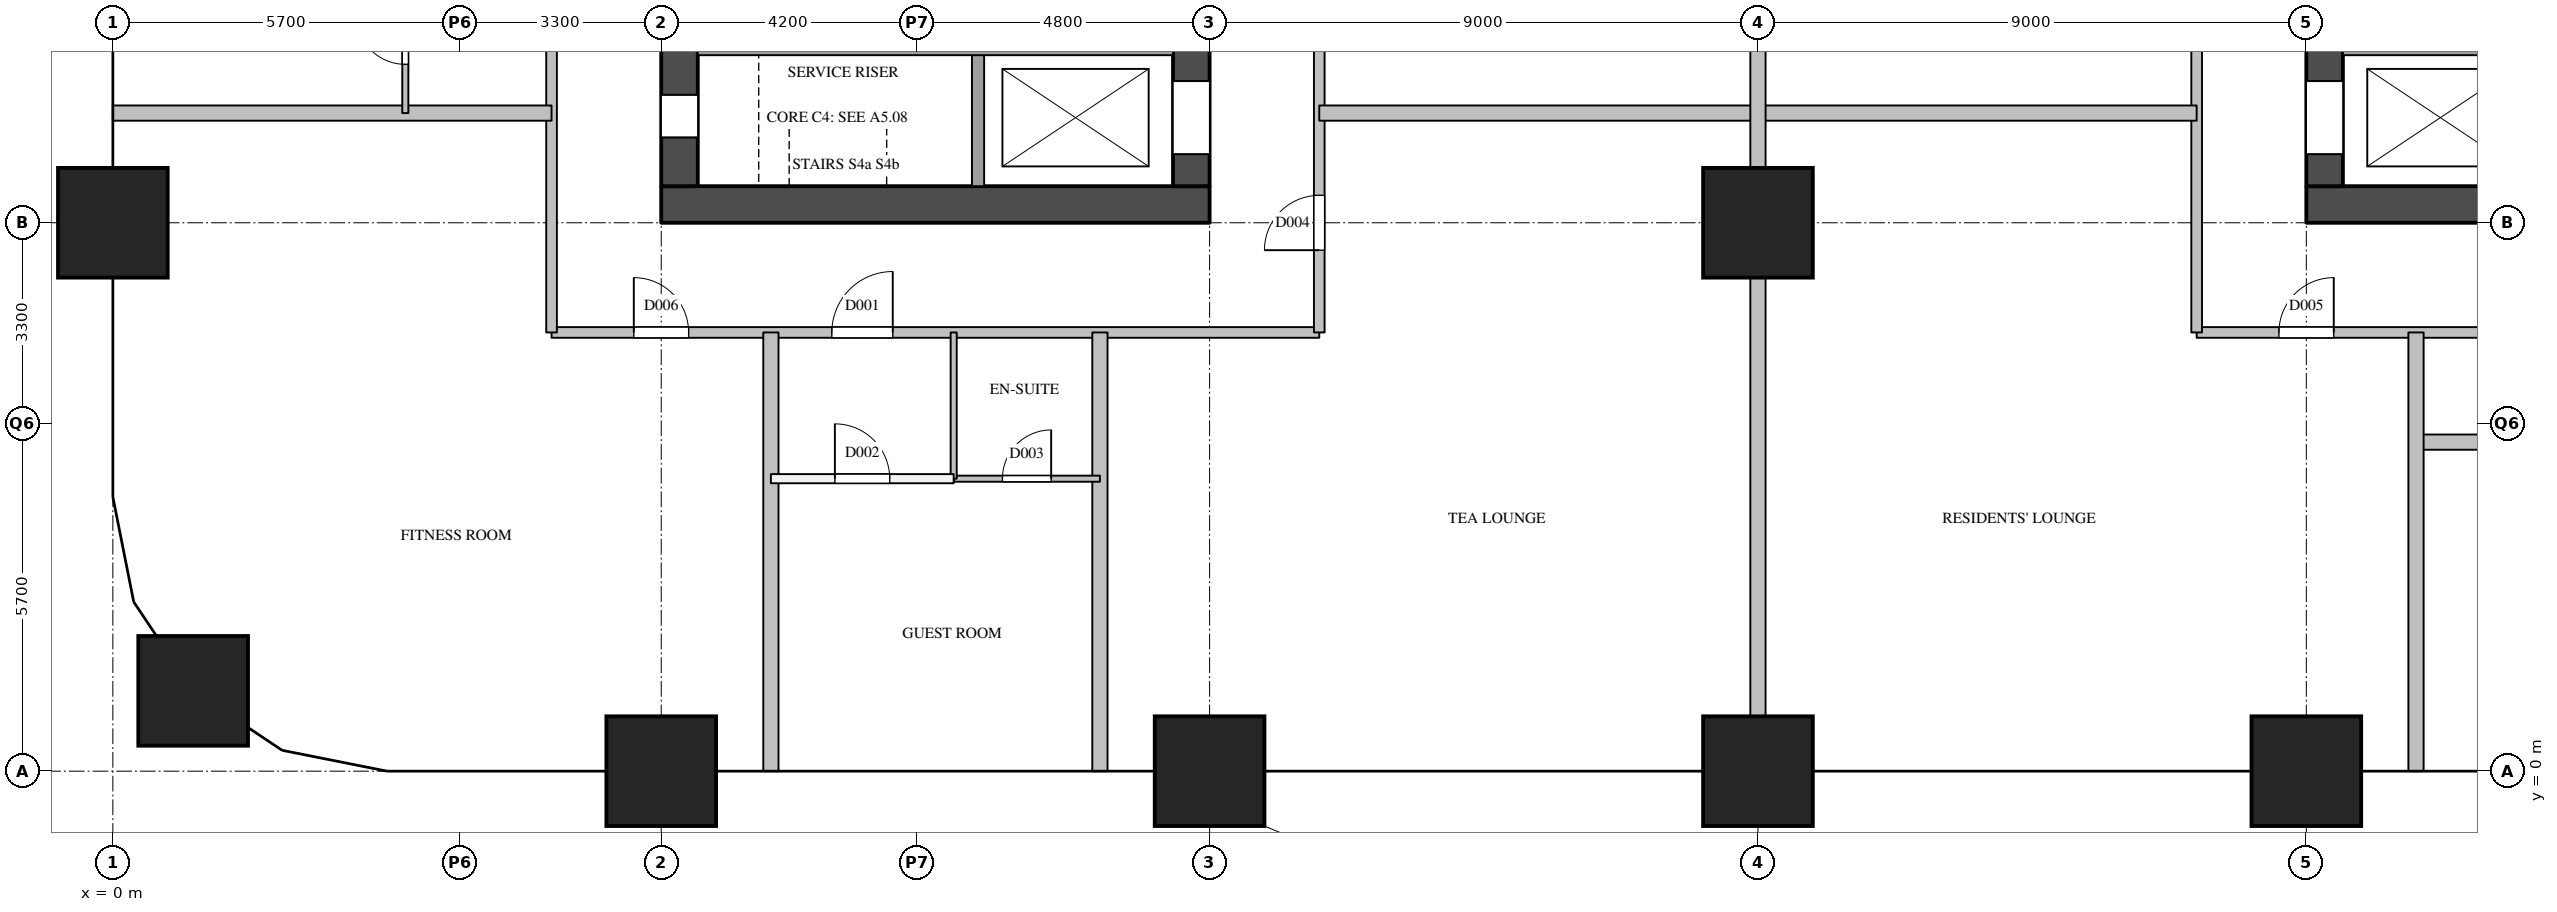
"""IFC4 building model, lengths in metres.
Left out: names, types, materials, properties, quantities, classifications, styles, units other than length and angle.
Written with IfcOpenShell. Run it as: python <this file> out.ifc"""

import sys

from ifc_helpers import new_model, si_unit, direction, frame, frame_2d, origin, origin_2d, place, context, subcontext, project, spatial, rectangle, extrude, element, fill, save


model = new_model("IFC4")
c1 = context("Model", 3, precision=1e-05, world=origin(), true_north=direction((0.0, 1.0)))
c2 = subcontext(c1, "Body", "Model", "MODEL_VIEW")
j1 = project(units=[si_unit("LENGTHUNIT", "METRE"), si_unit("PLANEANGLEUNIT", "RADIAN")], contexts=[c1])
p1 = place(None, origin())
s1 = spatial("IfcSite", under=j1, at=p1, CompositionType="ELEMENT")
p2 = place(p1, origin())
s2 = spatial("IfcBuilding", under=s1, at=p2, CompositionType="ELEMENT")
p3 = place(p2, frame((0.0, 0.0, 31.0)))
s3 = spatial("IfcBuildingStorey", under=s2, at=p3, CompositionType="ELEMENT", Elevation=31.0)
for number, where, z_axis, x_axis in (
    (1, (1.318, 1.318, 0.0), (0.0, 0.0, 1.0), (1.0, 0.0, 0.0)),
    (2, (0.0, 9.0, 0.0), (0.0, 0.0, 1.0), (1.0, 0.0, 0.0)),
    (3, (9.0, 0.0, 0.0), (0.0, 0.0, 1.0), (1.0, 0.0, 0.0)),
    (4, (18.0, 0.0, 0.0), (0.0, 0.0, 1.0), (1.0, 0.0, 0.0)),
    (5, (27.0, 0.0, 0.0), (0.0, 0.0, 1.0), (1.0, 0.0, 0.0)),
    (6, (27.0, 9.0, 0.0), (0.0, 0.0, 1.0), (1.0, 0.0, 0.0)),
    (7, (36.0, 0.0, 0.0), (0.0, 0.0, 1.0), (1.0, 0.0, 0.0)),
):
    element("IfcColumn", number, at=place(p3, frame(where, z_axis=z_axis, x_axis=x_axis)), inside=s3, PredefinedType="COLUMN", context=c2, shape_type="SweptSolid", body=[
        extrude(rectangle(XDim=1.8, YDim=1.8, at=origin_2d()), origin(), (0.0, 0.0, 1.0), 3.8),
    ])
p4 = place(p3, frame((36.0, 9.3, 0.0), z_axis=(0.0, 0.0, 1.0), x_axis=(1.0, 0.0, 0.0)))
e8 = element("IfcWall", 8, at=p4, inside=s3, PredefinedType="SHEAR", context=c2, shape_type="SweptSolid", body=[
    extrude(rectangle(XDim=9.0, YDim=0.6, at=frame_2d((4.5, 0.0))), origin(), (0.0, 0.0, 1.0), 3.5),
])
p5 = place(p3, frame((36.3, 9.6, 0.0), z_axis=(0.0, 0.0, 1.0), x_axis=(0.0, 1.0, 0.0)))
e9 = element("IfcWall", 9, at=p5, inside=s3, PredefinedType="SHEAR", context=c2, shape_type="SweptSolid", body=[
    extrude(rectangle(XDim=12.3, YDim=0.6, at=frame_2d((6.15, 0.0))), origin(), (0.0, 0.0, 1.0), 3.5),
])
p6 = place(p5, frame((0.525, 0.0, 0.0)))
e10 = element("IfcOpeningElement", 10, at=p6, cuts=e9, PredefinedType="OPENING", context=c2, shape_type="SweptSolid", body=[
    extrude(rectangle(XDim=1.2, YDim=2.1, at=frame_2d((0.6, 1.05))), frame((0.0, 0.31, 0.0), z_axis=(0.0, -1.0, 0.0), x_axis=(1.0, 0.0, 0.0)), (0.0, 0.0, 1.0), 0.62),
])
p7 = place(p5, frame((4.8, 0.0, 0.0)))
e11 = element("IfcOpeningElement", 11, at=p7, cuts=e9, PredefinedType="OPENING", context=c2, shape_type="SweptSolid", body=[
    extrude(rectangle(XDim=1.0, YDim=2.1, at=frame_2d((0.5, 1.05))), frame((0.0, 0.31, 0.0), z_axis=(0.0, -1.0, 0.0), x_axis=(1.0, 0.0, 0.0)), (0.0, 0.0, 1.0), 0.62),
])
p8 = place(p3, frame((36.6, 11.85, 0.0), z_axis=(0.0, 0.0, 1.0), x_axis=(1.0, 0.0, 0.0)))
e12 = element("IfcWall", 12, at=p8, inside=s3, PredefinedType="SOLIDWALL", context=c2, shape_type="SweptSolid", body=[
    extrude(rectangle(XDim=7.8, YDim=0.2, at=frame_2d((3.9, 0.0))), origin(), (0.0, 0.0, 1.0), 3.5),
])
p9 = place(p3, frame((9.0, 9.3, 0.0), z_axis=(0.0, 0.0, 1.0), x_axis=(1.0, 0.0, 0.0)))
e13 = element("IfcWall", 13, at=p9, inside=s3, PredefinedType="SHEAR", context=c2, shape_type="SweptSolid", body=[
    extrude(rectangle(XDim=9.0, YDim=0.6, at=frame_2d((4.5, 0.0))), origin(), (0.0, 0.0, 1.0), 3.5),
])
p10 = place(p3, frame((9.3, 9.6, 0.0), z_axis=(0.0, 0.0, 1.0), x_axis=(0.0, 1.0, 0.0)))
e14 = element("IfcWall", 14, at=p10, inside=s3, PredefinedType="SHEAR", context=c2, shape_type="SweptSolid", body=[
    extrude(rectangle(XDim=12.3, YDim=0.6, at=frame_2d((6.15, 0.0))), origin(), (0.0, 0.0, 1.0), 3.5),
])
p11 = place(p10, frame((0.8, 0.0, 0.0)))
e15 = element("IfcOpeningElement", 15, at=p11, cuts=e14, PredefinedType="OPENING", context=c2, shape_type="SweptSolid", body=[
    extrude(rectangle(XDim=0.7, YDim=2.1, at=frame_2d((0.35, 1.05))), frame((0.0, 0.31, 0.0), z_axis=(0.0, -1.0, 0.0), x_axis=(1.0, 0.0, 0.0)), (0.0, 0.0, 1.0), 0.62),
])
p12 = place(p10, frame((4.8, 0.0, 0.0)))
e16 = element("IfcOpeningElement", 16, at=p12, cuts=e14, PredefinedType="OPENING", context=c2, shape_type="SweptSolid", body=[
    extrude(rectangle(XDim=1.0, YDim=2.1, at=frame_2d((0.5, 1.05))), frame((0.0, 0.31, 0.0), z_axis=(0.0, -1.0, 0.0), x_axis=(1.0, 0.0, 0.0)), (0.0, 0.0, 1.0), 0.62),
])
p13 = place(p3, frame((17.7, 9.6, 0.0), z_axis=(0.0, 0.0, 1.0), x_axis=(0.0, 1.0, 0.0)))
e17 = element("IfcWall", 17, at=p13, inside=s3, PredefinedType="SHEAR", context=c2, shape_type="SweptSolid", body=[
    extrude(rectangle(XDim=12.3, YDim=0.6, at=frame_2d((6.15, 0.0))), origin(), (0.0, 0.0, 1.0), 3.5),
])
p14 = place(p13, frame((0.525, 0.0, 0.0)))
e18 = element("IfcOpeningElement", 18, at=p14, cuts=e17, PredefinedType="OPENING", context=c2, shape_type="SweptSolid", body=[
    extrude(rectangle(XDim=1.2, YDim=2.1, at=frame_2d((0.6, 1.05))), frame((0.0, 0.31, 0.0), z_axis=(0.0, -1.0, 0.0), x_axis=(1.0, 0.0, 0.0)), (0.0, 0.0, 1.0), 0.62),
])
p15 = place(p3, frame((14.2, 9.6, 0.0), z_axis=(0.0, 0.0, 1.0), x_axis=(0.0, 1.0, 0.0)))
e19 = element("IfcWall", 19, at=p15, inside=s3, PredefinedType="SOLIDWALL", context=c2, shape_type="SweptSolid", body=[
    extrude(rectangle(XDim=2.3, YDim=0.2, at=frame_2d((1.15, 0.0))), origin(), (0.0, 0.0, 1.0), 3.5),
])
p16 = place(p3, frame((9.6, 11.85, 0.0), z_axis=(0.0, 0.0, 1.0), x_axis=(1.0, 0.0, 0.0)))
e20 = element("IfcWall", 20, at=p16, inside=s3, PredefinedType="SOLIDWALL", context=c2, shape_type="SweptSolid", body=[
    extrude(rectangle(XDim=7.8, YDim=0.2, at=frame_2d((3.9, 0.0))), origin(), (0.0, 0.0, 1.0), 3.5),
])
p17 = place(p3, frame((7.2, 7.2, 0.0), z_axis=(0.0, 0.0, 1.0), x_axis=(1.0, 0.0, 0.0)))
e21 = element("IfcWall", 21, at=p17, inside=s3, PredefinedType="PARTITIONING", context=c2, shape_type="SweptSolid", body=[
    extrude(rectangle(XDim=12.6, YDim=0.175, at=frame_2d((6.3, 0.0))), origin(), (0.0, 0.0, 1.0), 3.5),
])
p18 = place(p17, frame((4.6, 0.0, 0.0)))
e22 = element("IfcOpeningElement", 22, at=p18, cuts=e21, PredefinedType="OPENING", context=c2, shape_type="SweptSolid", body=[
    extrude(rectangle(XDim=1.0, YDim=2.1, at=frame_2d((0.5, 1.05))), frame((0.0, 0.097, 0.0), z_axis=(0.0, -1.0, 0.0), x_axis=(1.0, 0.0, 0.0)), (0.0, 0.0, 1.0), 0.195),
])
p19 = place(p17, frame((1.35, 0.0, 0.0)))
e23 = element("IfcOpeningElement", 23, at=p19, cuts=e21, PredefinedType="OPENING", context=c2, shape_type="SweptSolid", body=[
    extrude(rectangle(XDim=0.9, YDim=2.1, at=frame_2d((0.45, 1.05))), frame((0.0, 0.097, 0.0), z_axis=(0.0, -1.0, 0.0), x_axis=(1.0, 0.0, 0.0)), (0.0, 0.0, 1.0), 0.195),
])
p20 = place(p3, frame((34.2, 7.2, 0.0), z_axis=(0.0, 0.0, 1.0), x_axis=(1.0, 0.0, 0.0)))
e24 = element("IfcWall", 24, at=p20, inside=s3, PredefinedType="PARTITIONING", context=c2, shape_type="SweptSolid", body=[
    extrude(rectangle(XDim=12.6, YDim=0.175, at=frame_2d((6.3, 0.0))), origin(), (0.0, 0.0, 1.0), 3.5),
])
p21 = place(p20, frame((1.35, 0.0, 0.0)))
e25 = element("IfcOpeningElement", 25, at=p21, cuts=e24, PredefinedType="OPENING", context=c2, shape_type="SweptSolid", body=[
    extrude(rectangle(XDim=0.9, YDim=2.1, at=frame_2d((0.45, 1.05))), frame((0.0, 0.097, 0.0), z_axis=(0.0, -1.0, 0.0), x_axis=(1.0, 0.0, 0.0)), (0.0, 0.0, 1.0), 0.195),
])
p22 = place(p20, frame((5.85, 0.0, 0.0)))
e26 = element("IfcOpeningElement", 26, at=p22, cuts=e24, PredefinedType="OPENING", context=c2, shape_type="SweptSolid", body=[
    extrude(rectangle(XDim=0.9, YDim=2.1, at=frame_2d((0.45, 1.05))), frame((0.0, 0.097, 0.0), z_axis=(0.0, -1.0, 0.0), x_axis=(1.0, 0.0, 0.0)), (0.0, 0.0, 1.0), 0.195),
])
p23 = place(p3, frame((7.2, 7.2, 0.0), z_axis=(0.0, 0.0, 1.0), x_axis=(0.0, 1.0, 0.0)))
e27 = element("IfcWall", 27, at=p23, inside=s3, PredefinedType="PARTITIONING", context=c2, shape_type="SweptSolid", body=[
    extrude(rectangle(XDim=16.49, YDim=0.175, at=frame_2d((8.245, 0.0))), origin(), (0.0, 0.0, 1.0), 3.5),
])
p24 = place(p23, frame((9.7, 0.0, 0.0)))
e28 = element("IfcOpeningElement", 28, at=p24, cuts=e27, PredefinedType="OPENING", context=c2, shape_type="SweptSolid", body=[
    extrude(rectangle(XDim=1.0, YDim=2.1, at=frame_2d((0.5, 1.05))), frame((0.0, 0.097, 0.0), z_axis=(0.0, -1.0, 0.0), x_axis=(1.0, 0.0, 0.0)), (0.0, 0.0, 1.0), 0.195),
])
p25 = place(p3, frame((19.8, 7.2, 0.0), z_axis=(0.0, 0.0, 1.0), x_axis=(0.0, 1.0, 0.0)))
e29 = element("IfcWall", 29, at=p25, inside=s3, PredefinedType="PARTITIONING", context=c2, shape_type="SweptSolid", body=[
    extrude(rectangle(XDim=16.49, YDim=0.175, at=frame_2d((8.245, 0.0))), origin(), (0.0, 0.0, 1.0), 3.5),
])
p26 = place(p25, frame((1.35, 0.0, 0.0)))
e30 = element("IfcOpeningElement", 30, at=p26, cuts=e29, PredefinedType="OPENING", context=c2, shape_type="SweptSolid", body=[
    extrude(rectangle(XDim=0.9, YDim=2.1, at=frame_2d((0.45, 1.05))), frame((0.0, 0.097, 0.0), z_axis=(0.0, -1.0, 0.0), x_axis=(1.0, 0.0, 0.0)), (0.0, 0.0, 1.0), 0.195),
])
p27 = place(p25, frame((8.5, 0.0, 0.0)))
e31 = element("IfcOpeningElement", 31, at=p27, cuts=e29, PredefinedType="OPENING", context=c2, shape_type="SweptSolid", body=[
    extrude(rectangle(XDim=1.0, YDim=2.1, at=frame_2d((0.5, 1.05))), frame((0.0, 0.097, 0.0), z_axis=(0.0, -1.0, 0.0), x_axis=(1.0, 0.0, 0.0)), (0.0, 0.0, 1.0), 0.195),
])
p28 = place(p3, frame((34.2, 7.2, 0.0), z_axis=(0.0, 0.0, 1.0), x_axis=(0.0, 1.0, 0.0)))
e32 = element("IfcWall", 32, at=p28, inside=s3, PredefinedType="PARTITIONING", context=c2, shape_type="SweptSolid", body=[
    extrude(rectangle(XDim=16.49, YDim=0.175, at=frame_2d((8.245, 0.0))), origin(), (0.0, 0.0, 1.0), 3.5),
])
p29 = place(p28, frame((5.8, 0.0, 0.0)))
e33 = element("IfcOpeningElement", 33, at=p29, cuts=e32, PredefinedType="OPENING", context=c2, shape_type="SweptSolid", body=[
    extrude(rectangle(XDim=1.0, YDim=2.1, at=frame_2d((0.5, 1.05))), frame((0.0, 0.097, 0.0), z_axis=(0.0, -1.0, 0.0), x_axis=(1.0, 0.0, 0.0)), (0.0, 0.0, 1.0), 0.195),
])
p30 = place(p28, frame((12.245, 0.0, 0.0)))
e34 = element("IfcOpeningElement", 34, at=p30, cuts=e32, PredefinedType="OPENING", context=c2, shape_type="SweptSolid", body=[
    extrude(rectangle(XDim=1.0, YDim=2.1, at=frame_2d((0.5, 1.05))), frame((0.0, 0.097, 0.0), z_axis=(0.0, -1.0, 0.0), x_axis=(1.0, 0.0, 0.0)), (0.0, 0.0, 1.0), 0.195),
])
p31 = place(p3, frame((10.8, 4.8, 0.0), z_axis=(0.0, 0.0, 1.0), x_axis=(1.0, 0.0, 0.0)))
e35 = element("IfcWall", 35, at=p31, inside=s3, PredefinedType="PARTITIONING", context=c2, shape_type="SweptSolid", body=[
    extrude(rectangle(XDim=3.0, YDim=0.15, at=frame_2d((1.5, 0.0))), origin(), (0.0, 0.0, 1.0), 3.5),
])
p32 = place(p31, frame((1.05, 0.0, 0.0)))
e36 = element("IfcOpeningElement", 36, at=p32, cuts=e35, PredefinedType="OPENING", context=c2, shape_type="SweptSolid", body=[
    extrude(rectangle(XDim=0.9, YDim=2.1, at=frame_2d((0.45, 1.05))), frame((0.0, 0.085, 0.0), z_axis=(0.0, -1.0, 0.0), x_axis=(1.0, 0.0, 0.0)), (0.0, 0.0, 1.0), 0.17),
])
p33 = place(p3, frame((37.8, 5.4, 0.0), z_axis=(0.0, 0.0, 1.0), x_axis=(1.0, 0.0, 0.0)))
e37 = element("IfcWall", 37, at=p33, inside=s3, PredefinedType="PARTITIONING", context=c2, shape_type="SweptSolid", body=[
    extrude(rectangle(XDim=5.525, YDim=0.25, at=frame_2d((2.762, 0.0))), origin(), (0.0, 0.0, 1.0), 3.5),
])
p34 = place(p3, frame((0.0, 10.8, 0.0), z_axis=(0.0, 0.0, 1.0), x_axis=(1.0, 0.0, 0.0)))
e38 = element("IfcWall", 38, at=p34, inside=s3, PredefinedType="PARTITIONING", context=c2, shape_type="SweptSolid", body=[
    extrude(rectangle(XDim=7.2, YDim=0.25, at=frame_2d((3.6, 0.0))), origin(), (0.0, 0.0, 1.0), 2.5),
])
p35 = place(p3, frame((19.8, 10.8, 0.0), z_axis=(0.0, 0.0, 1.0), x_axis=(1.0, 0.0, 0.0)))
e39 = element("IfcWall", 39, at=p35, inside=s3, PredefinedType="PARTITIONING", context=c2, shape_type="SweptSolid", body=[
    extrude(rectangle(XDim=14.4, YDim=0.25, at=frame_2d((7.2, 0.0))), origin(), (0.0, 0.0, 1.0), 2.5),
])
for number, where, z_axis, x_axis in (
    (40, (10.8, 0.0, 0.0), (0.0, 0.0, 1.0), (0.0, 1.0, 0.0)),
    (41, (16.2, 0.0, 0.0), (0.0, 0.0, 1.0), (0.0, 1.0, 0.0)),
):
    element("IfcWall", number, at=place(p3, frame(where, z_axis=z_axis, x_axis=x_axis)), inside=s3, PredefinedType="PARTITIONING", context=c2, shape_type="SweptSolid", body=[
        extrude(rectangle(XDim=7.2, YDim=0.25, at=frame_2d((3.6, 0.0))), origin(), (0.0, 0.0, 1.0), 2.5),
    ])
p36 = place(p3, frame((27.0, 0.0, 0.0), z_axis=(0.0, 0.0, 1.0), x_axis=(0.0, 1.0, 0.0)))
e42 = element("IfcWall", 42, at=p36, inside=s3, PredefinedType="PARTITIONING", context=c2, shape_type="SweptSolid", body=[
    extrude(rectangle(XDim=37.925, YDim=0.25, at=frame_2d((18.962, 0.0))), origin(), (0.0, 0.0, 1.0), 2.5),
])
p37 = place(p3, frame((37.8, 0.0, 0.0), z_axis=(0.0, 0.0, 1.0), x_axis=(0.0, 1.0, 0.0)))
e43 = element("IfcWall", 43, at=p37, inside=s3, PredefinedType="PARTITIONING", context=c2, shape_type="SweptSolid", body=[
    extrude(rectangle(XDim=7.2, YDim=0.25, at=frame_2d((3.6, 0.0))), origin(), (0.0, 0.0, 1.0), 2.5),
])
p38 = place(p3, frame((13.8, 4.8, 0.0), z_axis=(0.0, 0.0, 1.0), x_axis=(1.0, 0.0, 0.0)))
e44 = element("IfcWall", 44, at=p38, inside=s3, PredefinedType="PARTITIONING", context=c2, shape_type="SweptSolid", body=[
    extrude(rectangle(XDim=2.4, YDim=0.1, at=frame_2d((1.2, 0.0))), origin(), (0.0, 0.0, 1.0), 3.5),
])
p39 = place(p38, frame((0.8, 0.0, 0.0)))
e45 = element("IfcOpeningElement", 45, at=p39, cuts=e44, PredefinedType="OPENING", context=c2, shape_type="SweptSolid", body=[
    extrude(rectangle(XDim=0.8, YDim=2.1, at=frame_2d((0.4, 1.05))), frame((0.0, 0.06, 0.0), z_axis=(0.0, -1.0, 0.0), x_axis=(1.0, 0.0, 0.0)), (0.0, 0.0, 1.0), 0.12),
])
p40 = place(p3, frame((4.8, 10.8, 0.0), z_axis=(0.0, 0.0, 1.0), x_axis=(0.0, 1.0, 0.0)))
e46 = element("IfcWall", 46, at=p40, inside=s3, PredefinedType="PARTITIONING", context=c2, shape_type="SweptSolid", body=[
    extrude(rectangle(XDim=2.4, YDim=0.1, at=frame_2d((1.2, 0.0))), origin(), (0.0, 0.0, 1.0), 3.5),
])
p41 = place(p40, frame((0.8, 0.0, 0.0)))
e47 = element("IfcOpeningElement", 47, at=p41, cuts=e46, PredefinedType="OPENING", context=c2, shape_type="SweptSolid", body=[
    extrude(rectangle(XDim=0.8, YDim=2.1, at=frame_2d((0.4, 1.05))), frame((0.0, 0.06, 0.0), z_axis=(0.0, -1.0, 0.0), x_axis=(1.0, 0.0, 0.0)), (0.0, 0.0, 1.0), 0.12),
])
p42 = place(p3, frame((13.8, 4.8, 0.0), z_axis=(0.0, 0.0, 1.0), x_axis=(0.0, 1.0, 0.0)))
e48 = element("IfcWall", 48, at=p42, inside=s3, PredefinedType="PARTITIONING", context=c2, shape_type="SweptSolid", body=[
    extrude(rectangle(XDim=2.4, YDim=0.1, at=frame_2d((1.2, 0.0))), origin(), (0.0, 0.0, 1.0), 3.5),
])
p43 = place(p6, origin())
e49 = element("IfcDoor", 49, at=p43, inside=s3, OperationType="SLIDING_TO_LEFT", PredefinedType="DOOR", context=c2, shape_type="SweptSolid", body=[
    extrude(rectangle(XDim=1.2, YDim=2.1, at=frame_2d((0.6, 1.05))), frame((0.0, 0.025, 0.0), z_axis=(0.0, -1.0, 0.0), x_axis=(1.0, 0.0, 0.0)), (0.0, 0.0, 1.0), 0.05),
])
fill(e10, e49)
p44 = place(p14, origin())
e50 = element("IfcDoor", 50, at=p44, inside=s3, OperationType="SLIDING_TO_LEFT", PredefinedType="DOOR", context=c2, shape_type="SweptSolid", body=[
    extrude(rectangle(XDim=1.2, YDim=2.1, at=frame_2d((0.6, 1.05))), frame((0.0, 0.025, 0.0), z_axis=(0.0, -1.0, 0.0), x_axis=(1.0, 0.0, 0.0)), (0.0, 0.0, 1.0), 0.05),
])
fill(e18, e50)
p45 = place(p11, origin())
e51 = element("IfcDoor", 51, at=p45, inside=s3, OperationType="SINGLE_SWING_LEFT", PredefinedType="DOOR", context=c2, shape_type="SweptSolid", body=[
    extrude(rectangle(XDim=0.7, YDim=2.1, at=frame_2d((0.35, 1.05))), frame((0.0, 0.025, 0.0), z_axis=(0.0, -1.0, 0.0), x_axis=(1.0, 0.0, 0.0)), (0.0, 0.0, 1.0), 0.05),
])
fill(e15, e51)
p46 = place(p18, origin())
e52 = element("IfcDoor", 52, at=p46, inside=s3, OperationType="SINGLE_SWING_RIGHT", PredefinedType="DOOR", context=c2, shape_type="SweptSolid", body=[
    extrude(rectangle(XDim=1.0, YDim=2.1, at=frame_2d((0.5, 1.05))), frame((0.0, 0.025, 0.0), z_axis=(0.0, -1.0, 0.0), x_axis=(1.0, 0.0, 0.0)), (0.0, 0.0, 1.0), 0.05),
])
fill(e22, e52)
p47 = place(p32, origin())
e53 = element("IfcDoor", 53, at=p47, inside=s3, OperationType="SINGLE_SWING_LEFT", PredefinedType="DOOR", context=c2, shape_type="SweptSolid", body=[
    extrude(rectangle(XDim=0.9, YDim=2.1, at=frame_2d((0.45, 1.05))), frame((0.0, 0.025, 0.0), z_axis=(0.0, -1.0, 0.0), x_axis=(1.0, 0.0, 0.0)), (0.0, 0.0, 1.0), 0.05),
])
fill(e36, e53)
p48 = place(p39, origin())
e54 = element("IfcDoor", 54, at=p48, inside=s3, OperationType="SINGLE_SWING_RIGHT", PredefinedType="DOOR", context=c2, shape_type="SweptSolid", body=[
    extrude(rectangle(XDim=0.8, YDim=2.1, at=frame_2d((0.4, 1.05))), frame((0.0, 0.025, 0.0), z_axis=(0.0, -1.0, 0.0), x_axis=(1.0, 0.0, 0.0)), (0.0, 0.0, 1.0), 0.05),
])
fill(e45, e54)
p49 = place(p26, origin())
e55 = element("IfcDoor", 55, at=p49, inside=s3, OperationType="SINGLE_SWING_LEFT", PredefinedType="DOOR", context=c2, shape_type="SweptSolid", body=[
    extrude(rectangle(XDim=0.9, YDim=2.1, at=frame_2d((0.45, 1.05))), frame((0.0, 0.025, 0.0), z_axis=(0.0, -1.0, 0.0), x_axis=(1.0, 0.0, 0.0)), (0.0, 0.0, 1.0), 0.05),
])
fill(e30, e55)
p50 = place(p21, origin())
e56 = element("IfcDoor", 56, at=p50, inside=s3, OperationType="SINGLE_SWING_RIGHT", PredefinedType="DOOR", context=c2, shape_type="SweptSolid", body=[
    extrude(rectangle(XDim=0.9, YDim=2.1, at=frame_2d((0.45, 1.05))), frame((0.0, 0.025, 0.0), z_axis=(0.0, -1.0, 0.0), x_axis=(1.0, 0.0, 0.0)), (0.0, 0.0, 1.0), 0.05),
])
fill(e25, e56)
p51 = place(p19, origin())
e57 = element("IfcDoor", 57, at=p51, inside=s3, OperationType="SINGLE_SWING_LEFT", PredefinedType="DOOR", context=c2, shape_type="SweptSolid", body=[
    extrude(rectangle(XDim=0.9, YDim=2.1, at=frame_2d((0.45, 1.05))), frame((0.0, 0.025, 0.0), z_axis=(0.0, -1.0, 0.0), x_axis=(1.0, 0.0, 0.0)), (0.0, 0.0, 1.0), 0.05),
])
fill(e23, e57)
p52 = place(p41, origin())
e58 = element("IfcDoor", 58, at=p52, inside=s3, OperationType="SINGLE_SWING_RIGHT", PredefinedType="DOOR", context=c2, shape_type="SweptSolid", body=[
    extrude(rectangle(XDim=0.8, YDim=2.1, at=frame_2d((0.4, 1.05))), frame((0.0, 0.025, 0.0), z_axis=(0.0, -1.0, 0.0), x_axis=(1.0, 0.0, 0.0)), (0.0, 0.0, 1.0), 0.05),
])
fill(e47, e58)
save(model, sys.argv[1])
